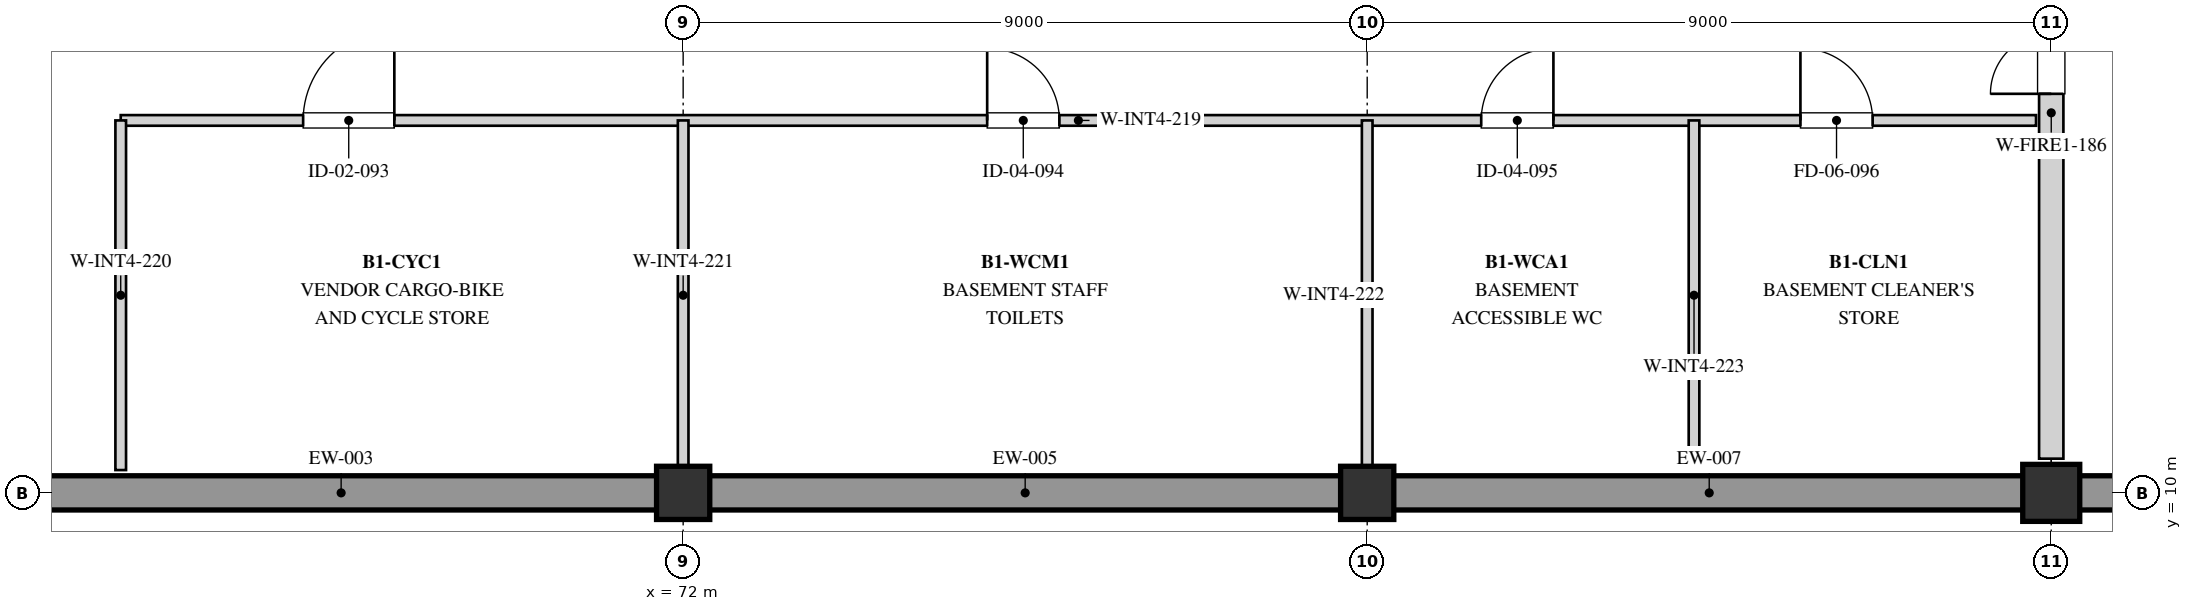
"""IFC4 building model, lengths in metres.
Left out: names, types, materials, properties, quantities, classifications, styles, units other than length and angle.
Written with IfcOpenShell. Run it as: python <this file> out.ifc"""

import sys

from ifc_helpers import new_model, si_unit, direction, frame, frame_2d, origin, origin_2d, place, context, subcontext, project, spatial, rectangle, extrude, element, fill, save


model = new_model("IFC4")
c1 = context("Model", 3, precision=1e-05, world=origin(), true_north=direction((0.0, 1.0)))
c2 = subcontext(c1, "Body", "Model", "MODEL_VIEW")
j1 = project(units=[si_unit("LENGTHUNIT", "METRE"), si_unit("PLANEANGLEUNIT", "RADIAN")], contexts=[c1])
p1 = place(None, origin())
s1 = spatial("IfcSite", under=j1, at=p1, CompositionType="ELEMENT")
p2 = place(p1, origin())
s2 = spatial("IfcBuilding", under=s1, at=p2, CompositionType="ELEMENT")
p3 = place(p2, frame((0.0, 0.0, -4.2)))
s3 = spatial("IfcBuildingStorey", under=s2, at=p3, CompositionType="ELEMENT", Elevation=-4.2)
for number, where, z_axis, x_axis in (
    (1, (72.0, 10.0, 0.0), (0.0, 0.0, 1.0), (1.0, 0.0, 0.0)),
    (2, (81.0, 10.0, 0.0), (0.0, 0.0, 1.0), (1.0, 0.0, 0.0)),
):
    element("IfcColumn", number, at=place(p3, frame(where, z_axis=z_axis, x_axis=x_axis)), inside=s3, PredefinedType="COLUMN", context=c2, shape_type="SweptSolid", body=[
        extrude(rectangle(XDim=0.7, YDim=0.7, at=origin_2d()), origin(), (0.0, 0.0, 1.0), 4.2),
    ])
p4 = place(p3, frame((90.0, 10.0, 0.0), z_axis=(0.0, 0.0, 1.0), x_axis=(1.0, 0.0, 0.0)))
e3 = element("IfcColumn", 3, at=p4, inside=s3, PredefinedType="COLUMN", context=c2, shape_type="SweptSolid", body=[
    extrude(rectangle(XDim=0.75, YDim=0.75, at=origin_2d()), origin(), (0.0, 0.0, 1.0), 4.2),
])
for number, where, z_axis, x_axis in (
    (4, (63.0, 10.0, 0.0), (0.0, 0.0, 1.0), (1.0, 0.0, 0.0)),
    (5, (72.0, 10.0, 0.0), (0.0, 0.0, 1.0), (1.0, 0.0, 0.0)),
    (6, (81.0, 10.0, 0.0), (0.0, 0.0, 1.0), (1.0, 0.0, 0.0)),
    (7, (90.0, 10.0, 0.0), (0.0, 0.0, 1.0), (1.0, 0.0, 0.0)),
):
    element("IfcWall", number, at=place(p3, frame(where, z_axis=z_axis, x_axis=x_axis)), inside=s3, PredefinedType="USERDEFINED", context=c2, shape_type="SweptSolid", body=[
        extrude(rectangle(XDim=9.0, YDim=0.45, at=frame_2d((4.5, 0.0))), origin(), (0.0, 0.0, 1.0), 3.82),
    ])
p5 = place(p3, frame((90.0, 10.45, 0.0), z_axis=(0.0, 0.0, 1.0), x_axis=(0.0, 1.0, 0.0)))
e8 = element("IfcWall", 8, at=p5, inside=s3, PredefinedType="SOLIDWALL", context=c2, shape_type="SweptSolid", body=[
    extrude(rectangle(XDim=9.1, YDim=0.32, at=frame_2d((4.55, 0.0))), origin(), (0.0, 0.0, 1.0), 2.85),
])
p6 = place(p5, frame((4.8, 0.0, 0.0)))
e9 = element("IfcOpeningElement", 9, at=p6, cuts=e8, PredefinedType="OPENING", context=c2, shape_type="SweptSolid", body=[
    extrude(rectangle(XDim=1.6, YDim=2.2, at=frame_2d((0.8, 1.1))), frame((0.0, 0.17, 0.0), z_axis=(0.0, -1.0, 0.0), x_axis=(1.0, 0.0, 0.0)), (0.0, 0.0, 1.0), 0.34),
])
p7 = place(p3, frame((64.6, 14.9, 0.0), z_axis=(0.0, 0.0, 1.0), x_axis=(1.0, 0.0, 0.0)))
e10 = element("IfcWall", 10, at=p7, inside=s3, PredefinedType="PARTITIONING", context=c2, shape_type="SweptSolid", body=[
    extrude(rectangle(XDim=25.2, YDim=0.14, at=frame_2d((12.6, 0.0))), origin(), (0.0, 0.0, 1.0), 2.85),
])
p8 = place(p7, frame((2.4, 0.0, 0.0)))
e11 = element("IfcOpeningElement", 11, at=p8, cuts=e10, PredefinedType="OPENING", context=c2, shape_type="SweptSolid", body=[
    extrude(rectangle(XDim=1.2, YDim=2.15, at=frame_2d((0.6, 1.075))), frame((0.0, 0.08, 0.0), z_axis=(0.0, -1.0, 0.0), x_axis=(1.0, 0.0, 0.0)), (0.0, 0.0, 1.0), 0.16),
])
p9 = place(p7, frame((11.4, 0.0, 0.0)))
e12 = element("IfcOpeningElement", 12, at=p9, cuts=e10, PredefinedType="OPENING", context=c2, shape_type="SweptSolid", body=[
    extrude(rectangle(XDim=0.95, YDim=2.1, at=frame_2d((0.475, 1.05))), frame((0.0, 0.08, 0.0), z_axis=(0.0, -1.0, 0.0), x_axis=(1.0, 0.0, 0.0)), (0.0, 0.0, 1.0), 0.16),
])
p10 = place(p7, frame((17.9, 0.0, 0.0)))
e13 = element("IfcOpeningElement", 13, at=p10, cuts=e10, PredefinedType="OPENING", context=c2, shape_type="SweptSolid", body=[
    extrude(rectangle(XDim=0.95, YDim=2.1, at=frame_2d((0.475, 1.05))), frame((0.0, 0.08, 0.0), z_axis=(0.0, -1.0, 0.0), x_axis=(1.0, 0.0, 0.0)), (0.0, 0.0, 1.0), 0.16),
])
p11 = place(p7, frame((22.1, 0.0, 0.0)))
e14 = element("IfcOpeningElement", 14, at=p11, cuts=e10, PredefinedType="OPENING", context=c2, shape_type="SweptSolid", body=[
    extrude(rectangle(XDim=0.95, YDim=2.05, at=frame_2d((0.475, 1.025))), frame((0.0, 0.08, 0.0), z_axis=(0.0, -1.0, 0.0), x_axis=(1.0, 0.0, 0.0)), (0.0, 0.0, 1.0), 0.16),
])
for number, where, z_axis, x_axis in (
    (15, (64.6, 10.3, 0.0), (0.0, 0.0, 1.0), (0.0, 1.0, 0.0)),
    (16, (72.0, 10.3, 0.0), (0.0, 0.0, 1.0), (0.0, 1.0, 0.0)),
    (17, (81.0, 10.3, 0.0), (0.0, 0.0, 1.0), (0.0, 1.0, 0.0)),
    (18, (85.3, 10.3, 0.0), (0.0, 0.0, 1.0), (0.0, 1.0, 0.0)),
):
    element("IfcWall", number, at=place(p3, frame(where, z_axis=z_axis, x_axis=x_axis)), inside=s3, PredefinedType="PARTITIONING", context=c2, shape_type="SweptSolid", body=[
        extrude(rectangle(XDim=4.6, YDim=0.14, at=frame_2d((2.3, 0.0))), origin(), (0.0, 0.0, 1.0), 2.85),
    ])
p12 = place(p6, origin())
e19 = element("IfcDoor", 19, at=p12, inside=s3, OperationType="DOUBLE_DOOR_SINGLE_SWING", PredefinedType="DOOR", context=c2, shape_type="SweptSolid", body=[
    extrude(rectangle(XDim=1.6, YDim=2.2, at=frame_2d((0.8, 1.1))), frame((0.0, 0.025, 0.0), z_axis=(0.0, -1.0, 0.0), x_axis=(1.0, 0.0, 0.0)), (0.0, 0.0, 1.0), 0.05),
])
fill(e9, e19)
p13 = place(p8, origin())
e20 = element("IfcDoor", 20, at=p13, inside=s3, OperationType="SINGLE_SWING_RIGHT", PredefinedType="DOOR", context=c2, shape_type="SweptSolid", body=[
    extrude(rectangle(XDim=1.2, YDim=2.15, at=frame_2d((0.6, 1.075))), frame((0.0, 0.025, 0.0), z_axis=(0.0, -1.0, 0.0), x_axis=(1.0, 0.0, 0.0)), (0.0, 0.0, 1.0), 0.05),
])
fill(e11, e20)
p14 = place(p9, origin())
e21 = element("IfcDoor", 21, at=p14, inside=s3, OperationType="SINGLE_SWING_LEFT", PredefinedType="DOOR", context=c2, shape_type="SweptSolid", body=[
    extrude(rectangle(XDim=0.95, YDim=2.1, at=frame_2d((0.475, 1.05))), frame((0.0, 0.025, 0.0), z_axis=(0.0, -1.0, 0.0), x_axis=(1.0, 0.0, 0.0)), (0.0, 0.0, 1.0), 0.05),
])
fill(e12, e21)
p15 = place(p10, origin())
e22 = element("IfcDoor", 22, at=p15, inside=s3, OperationType="SINGLE_SWING_RIGHT", PredefinedType="DOOR", context=c2, shape_type="SweptSolid", body=[
    extrude(rectangle(XDim=0.95, YDim=2.1, at=frame_2d((0.475, 1.05))), frame((0.0, 0.025, 0.0), z_axis=(0.0, -1.0, 0.0), x_axis=(1.0, 0.0, 0.0)), (0.0, 0.0, 1.0), 0.05),
])
fill(e13, e22)
p16 = place(p11, origin())
e23 = element("IfcDoor", 23, at=p16, inside=s3, OperationType="SINGLE_SWING_LEFT", PredefinedType="DOOR", context=c2, shape_type="SweptSolid", body=[
    extrude(rectangle(XDim=0.95, YDim=2.05, at=frame_2d((0.475, 1.025))), frame((0.0, 0.025, 0.0), z_axis=(0.0, -1.0, 0.0), x_axis=(1.0, 0.0, 0.0)), (0.0, 0.0, 1.0), 0.05),
])
fill(e14, e23)
save(model, sys.argv[1])
